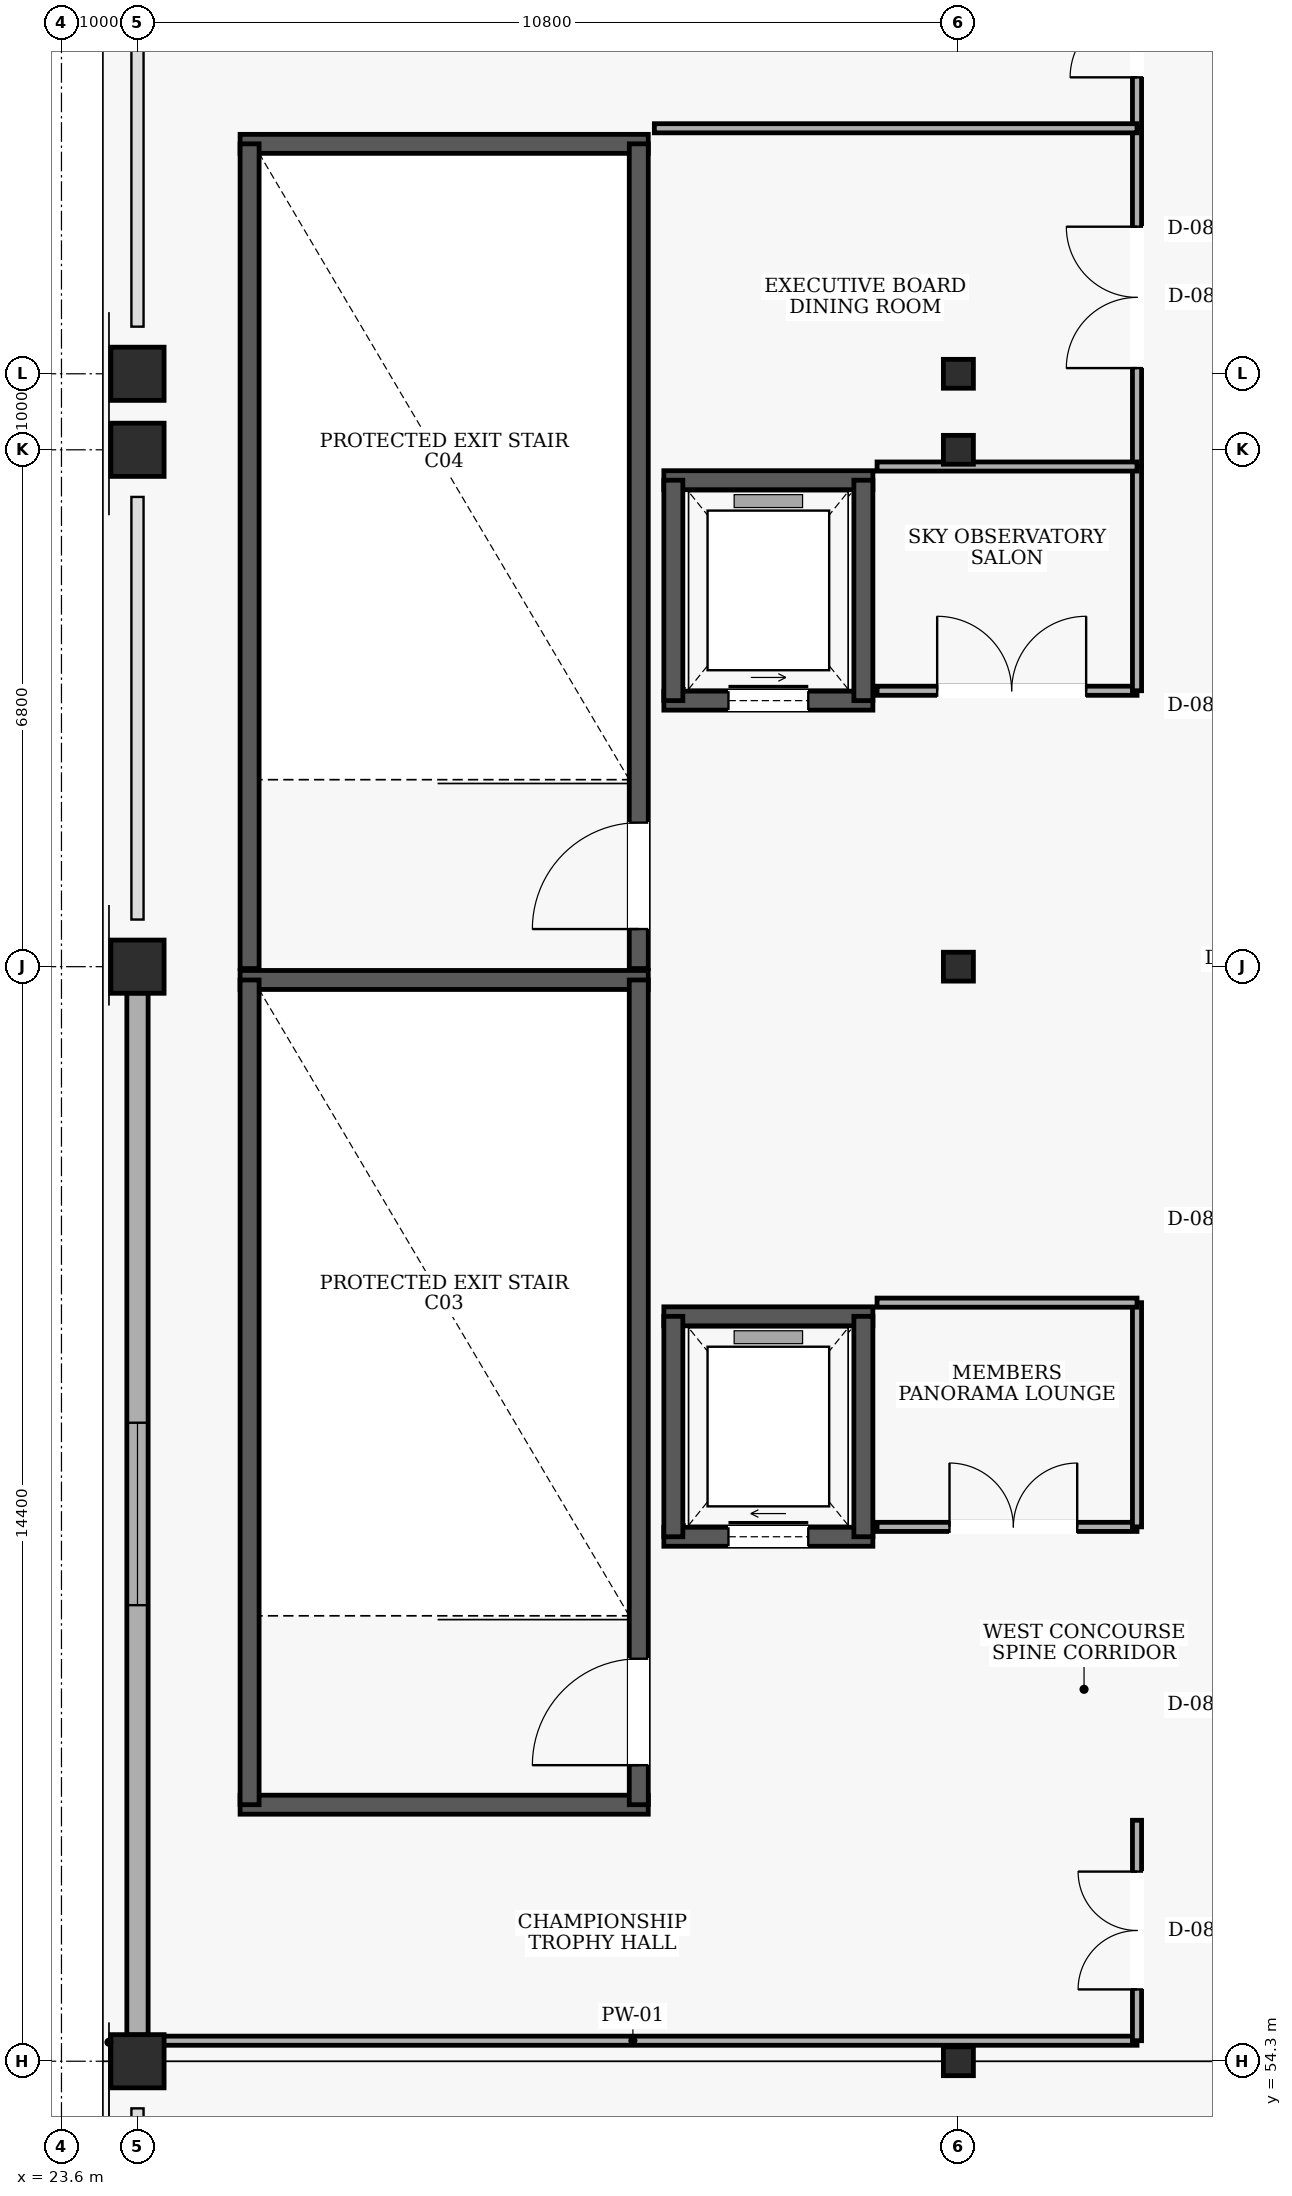
"""IFC4 building model, lengths in metres.
Left out: names, types, materials, properties, quantities, classifications, styles, units other than length and angle.
Written with IfcOpenShell. Run it as: python <this file> out.ifc"""

import sys

from ifc_helpers import new_model, si_unit, direction, frame, frame_2d, origin, origin_2d, place, context, subcontext, project, spatial, rectangle, i_section, extrude, element, fill, save


model = new_model("IFC4")
c1 = context("Model", 3, precision=1e-05, world=origin(), true_north=direction((0.0, 1.0)))
c2 = subcontext(c1, "Body", "Model", "MODEL_VIEW")
j1 = project(units=[si_unit("LENGTHUNIT", "METRE"), si_unit("PLANEANGLEUNIT", "RADIAN")], contexts=[c1])
p1 = place(None, origin())
s1 = spatial("IfcSite", under=j1, at=p1, CompositionType="ELEMENT")
p2 = place(p1, origin())
s2 = spatial("IfcBuilding", under=s1, at=p2, CompositionType="ELEMENT")
p3 = place(p2, frame((0.0, 0.0, 29.4)))
s3 = spatial("IfcBuildingStorey", under=s2, at=p3, CompositionType="ELEMENT", Elevation=29.4)
for number, where, z_axis, x_axis in (
    (1, (24.6, 54.3, 0.0), (0.0, 0.0, 1.0), (1.0, 0.0, 0.0)),
    (2, (24.6, 68.7, 0.0), (0.0, 0.0, 1.0), (1.0, 0.0, 0.0)),
    (3, (24.6, 75.5, 0.0), (0.0, 0.0, 1.0), (1.0, 0.0, 0.0)),
    (4, (24.6, 76.5, 0.0), (0.0, 0.0, 1.0), (1.0, 0.0, 0.0)),
):
    element("IfcColumn", number, at=place(p3, frame(where, z_axis=z_axis, x_axis=x_axis)), inside=s3, PredefinedType="COLUMN", context=c2, shape_type="SweptSolid", body=[
        extrude(rectangle(XDim=0.7, YDim=0.7, at=origin_2d()), origin(), (0.0, 0.0, 1.0), 4.8),
    ])
for number, where, z_axis, x_axis in (
    (5, (35.4, 54.3, 0.0), (0.0, 0.0, 1.0), (1.0, 0.0, 0.0)),
    (6, (35.4, 68.7, 0.0), (0.0, 0.0, 1.0), (1.0, 0.0, 0.0)),
    (7, (35.4, 75.5, 0.0), (0.0, 0.0, 1.0), (1.0, 0.0, 0.0)),
    (8, (35.4, 76.5, 0.0), (0.0, 0.0, 1.0), (1.0, 0.0, 0.0)),
):
    element("IfcColumn", number, at=place(p3, frame(where, z_axis=z_axis, x_axis=x_axis)), inside=s3, PredefinedType="COLUMN", context=c2, shape_type="SweptSolid", body=[
        extrude(i_section(OverallWidth=0.395, OverallDepth=0.38, WebThickness=0.019, FlangeThickness=0.03, at=origin_2d()), origin(), (0.0, 0.0, 1.0), 4.8),
    ])
p4 = place(p3, frame((24.6, 54.645, 0.0), z_axis=(0.0, 0.0, 1.0), x_axis=(0.0, 1.0, 0.0)))
e9 = element("IfcWall", 9, at=p4, inside=s3, PredefinedType="SOLIDWALL", context=c2, shape_type="SweptSolid", body=[
    extrude(rectangle(XDim=13.71, YDim=0.28, at=frame_2d((6.855, 0.0))), origin(), (0.0, 0.0, 1.0), 3.68),
])
p5 = place(p4, frame((5.655, 0.0, 0.9)))
e10 = element("IfcOpeningElement", 10, at=p5, cuts=e9, PredefinedType="OPENING", context=c2, shape_type="SweptSolid", body=[
    extrude(rectangle(XDim=2.4, YDim=1.8, at=frame_2d((1.2, 0.9))), frame((0.0, 0.15, 0.0), z_axis=(0.0, -1.0, 0.0), x_axis=(1.0, 0.0, 0.0)), (0.0, 0.0, 1.0), 0.3),
])
for number, where, z_axis, x_axis in (
    (11, (25.95, 57.675, 0.0), (0.0, 0.0, 1.0), (1.0, 0.0, 0.0)),
    (12, (31.32, 68.525, 0.0), (0.0, 0.0, 1.0), (-1.0, 0.0, 0.0)),
):
    element("IfcWall", number, at=place(p3, frame(where, z_axis=z_axis, x_axis=x_axis)), inside=s3, PredefinedType="SHEAR", context=c2, shape_type="SweptSolid", body=[
        extrude(rectangle(XDim=5.37, YDim=0.25, at=frame_2d((2.685, 0.0))), origin(), (0.0, 0.0, 1.0), 4.5),
    ])
p6 = place(p3, frame((26.075, 57.675, 0.0), z_axis=(0.0, 0.0, 1.0), x_axis=(0.0, 1.0, 0.0)))
e13 = element("IfcWall", 13, at=p6, inside=s3, PredefinedType="SHEAR", context=c2, shape_type="SweptSolid", body=[
    extrude(rectangle(XDim=10.85, YDim=0.25, at=frame_2d((5.425, 0.0))), origin(), (0.0, 0.0, 1.0), 4.5),
])
p7 = place(p3, frame((31.195, 57.675, 0.0), z_axis=(0.0, 0.0, 1.0), x_axis=(0.0, 1.0, 0.0)))
e14 = element("IfcWall", 14, at=p7, inside=s3, PredefinedType="SHEAR", context=c2, shape_type="SweptSolid", body=[
    extrude(rectangle(XDim=10.85, YDim=0.25, at=frame_2d((5.425, 0.0))), origin(), (0.0, 0.0, 1.0), 4.5),
])
p8 = place(p7, frame((0.52, 0.0, 0.0)))
e15 = element("IfcOpeningElement", 15, at=p8, cuts=e14, PredefinedType="OPENING", context=c2, shape_type="SweptSolid", body=[
    extrude(rectangle(XDim=1.4, YDim=2.15, at=frame_2d((0.7, 1.075))), frame((0.0, 0.135, 0.0), z_axis=(0.0, -1.0, 0.0), x_axis=(1.0, 0.0, 0.0)), (0.0, 0.0, 1.0), 0.27),
])
p9 = place(p3, frame((31.32, 79.525, 0.0), z_axis=(0.0, 0.0, 1.0), x_axis=(-1.0, 0.0, 0.0)))
e16 = element("IfcWall", 16, at=p9, inside=s3, PredefinedType="SHEAR", context=c2, shape_type="SweptSolid", body=[
    extrude(rectangle(XDim=5.37, YDim=0.25, at=frame_2d((2.685, 0.0))), origin(), (0.0, 0.0, 1.0), 4.5),
])
p10 = place(p3, frame((26.075, 68.675, 0.0), z_axis=(0.0, 0.0, 1.0), x_axis=(0.0, 1.0, 0.0)))
e17 = element("IfcWall", 17, at=p10, inside=s3, PredefinedType="SHEAR", context=c2, shape_type="SweptSolid", body=[
    extrude(rectangle(XDim=10.85, YDim=0.25, at=frame_2d((5.425, 0.0))), origin(), (0.0, 0.0, 1.0), 4.5),
])
p11 = place(p3, frame((31.195, 68.675, 0.0), z_axis=(0.0, 0.0, 1.0), x_axis=(0.0, 1.0, 0.0)))
e18 = element("IfcWall", 18, at=p11, inside=s3, PredefinedType="SHEAR", context=c2, shape_type="SweptSolid", body=[
    extrude(rectangle(XDim=10.85, YDim=0.25, at=frame_2d((5.425, 0.0))), origin(), (0.0, 0.0, 1.0), 4.5),
])
p12 = place(p11, frame((0.52, 0.0, 0.0)))
e19 = element("IfcOpeningElement", 19, at=p12, cuts=e18, PredefinedType="OPENING", context=c2, shape_type="SweptSolid", body=[
    extrude(rectangle(XDim=1.4, YDim=2.15, at=frame_2d((0.7, 1.075))), frame((0.0, 0.135, 0.0), z_axis=(0.0, -1.0, 0.0), x_axis=(1.0, 0.0, 0.0)), (0.0, 0.0, 1.0), 0.27),
])
p13 = place(p3, frame((31.525, 61.2, 0.0), z_axis=(0.0, 0.0, 1.0), x_axis=(1.0, 0.0, 0.0)))
e20 = element("IfcWall", 20, at=p13, inside=s3, PredefinedType="SHEAR", context=c2, shape_type="SweptSolid", body=[
    extrude(rectangle(XDim=2.75, YDim=0.25, at=frame_2d((1.375, 0.0))), origin(), (0.0, 0.0, 1.0), 4.5),
])
p14 = place(p13, frame((0.85, 0.0, 0.0)))
e21 = element("IfcOpeningElement", 21, at=p14, cuts=e20, PredefinedType="OPENING", context=c2, shape_type="SweptSolid", body=[
    extrude(rectangle(XDim=1.05, YDim=2.15, at=frame_2d((0.525, 1.075))), frame((0.0, 0.135, 0.0), z_axis=(0.0, -1.0, 0.0), x_axis=(1.0, 0.0, 0.0)), (0.0, 0.0, 1.0), 0.27),
])
p15 = place(p3, frame((34.275, 64.1, 0.0), z_axis=(0.0, 0.0, 1.0), x_axis=(-1.0, 0.0, 0.0)))
e22 = element("IfcWall", 22, at=p15, inside=s3, PredefinedType="SHEAR", context=c2, shape_type="SweptSolid", body=[
    extrude(rectangle(XDim=2.75, YDim=0.25, at=frame_2d((1.375, 0.0))), origin(), (0.0, 0.0, 1.0), 4.5),
])
for number, where, z_axis, x_axis in (
    (23, (31.65, 64.1, 0.0), (0.0, 0.0, 1.0), (0.0, -1.0, 0.0)),
    (24, (34.15, 61.2, 0.0), (0.0, 0.0, 1.0), (0.0, 1.0, 0.0)),
):
    element("IfcWall", number, at=place(p3, frame(where, z_axis=z_axis, x_axis=x_axis)), inside=s3, PredefinedType="SHEAR", context=c2, shape_type="SweptSolid", body=[
        extrude(rectangle(XDim=2.9, YDim=0.25, at=frame_2d((1.45, 0.0))), origin(), (0.0, 0.0, 1.0), 4.5),
    ])
p16 = place(p3, frame((31.525, 72.2, 0.0), z_axis=(0.0, 0.0, 1.0), x_axis=(1.0, 0.0, 0.0)))
e25 = element("IfcWall", 25, at=p16, inside=s3, PredefinedType="SHEAR", context=c2, shape_type="SweptSolid", body=[
    extrude(rectangle(XDim=2.75, YDim=0.25, at=frame_2d((1.375, 0.0))), origin(), (0.0, 0.0, 1.0), 4.5),
])
p17 = place(p16, frame((0.85, 0.0, 0.0)))
e26 = element("IfcOpeningElement", 26, at=p17, cuts=e25, PredefinedType="OPENING", context=c2, shape_type="SweptSolid", body=[
    extrude(rectangle(XDim=1.05, YDim=2.15, at=frame_2d((0.525, 1.075))), frame((0.0, 0.135, 0.0), z_axis=(0.0, -1.0, 0.0), x_axis=(1.0, 0.0, 0.0)), (0.0, 0.0, 1.0), 0.27),
])
p18 = place(p3, frame((34.275, 75.1, 0.0), z_axis=(0.0, 0.0, 1.0), x_axis=(-1.0, 0.0, 0.0)))
e27 = element("IfcWall", 27, at=p18, inside=s3, PredefinedType="SHEAR", context=c2, shape_type="SweptSolid", body=[
    extrude(rectangle(XDim=2.75, YDim=0.25, at=frame_2d((1.375, 0.0))), origin(), (0.0, 0.0, 1.0), 4.5),
])
for number, where, z_axis, x_axis in (
    (28, (31.65, 75.1, 0.0), (0.0, 0.0, 1.0), (0.0, -1.0, 0.0)),
    (29, (34.15, 72.2, 0.0), (0.0, 0.0, 1.0), (0.0, 1.0, 0.0)),
):
    element("IfcWall", number, at=place(p3, frame(where, z_axis=z_axis, x_axis=x_axis)), inside=s3, PredefinedType="SHEAR", context=c2, shape_type="SweptSolid", body=[
        extrude(rectangle(XDim=2.9, YDim=0.25, at=frame_2d((1.45, 0.0))), origin(), (0.0, 0.0, 1.0), 4.5),
    ])
p19 = place(p3, frame((24.485, 54.57, 0.0), z_axis=(0.0, 0.0, 1.0), x_axis=(1.0, 0.0, 0.0)))
e30 = element("IfcWall", 30, at=p19, inside=s3, PredefinedType="PARTITIONING", context=c2, shape_type="SweptSolid", body=[
    extrude(rectangle(XDim=13.265, YDim=0.12, at=frame_2d((6.632, 0.0))), origin(), (0.0, 0.0, 1.0), 3.78),
])
p20 = place(p3, frame((37.75, 54.57, 0.0), z_axis=(0.0, 0.0, 1.0), x_axis=(0.0, 1.0, 0.0)))
e31 = element("IfcWall", 31, at=p20, inside=s3, PredefinedType="PARTITIONING", context=c2, shape_type="SweptSolid", body=[
    extrude(rectangle(XDim=2.9, YDim=0.12, at=frame_2d((1.45, 0.0))), origin(), (0.0, 0.0, 1.0), 4.5),
])
p21 = place(p20, frame((0.675, 0.0, 0.0)))
e32 = element("IfcOpeningElement", 32, at=p21, cuts=e31, PredefinedType="OPENING", context=c2, shape_type="SweptSolid", body=[
    extrude(rectangle(XDim=1.55, YDim=2.2, at=frame_2d((0.775, 1.1))), frame((0.0, 0.07, 0.0), z_axis=(0.0, -1.0, 0.0), x_axis=(1.0, 0.0, 0.0)), (0.0, 0.0, 1.0), 0.14),
])
p22 = place(p3, frame((34.33, 61.33, 0.0), z_axis=(0.0, 0.0, 1.0), x_axis=(1.0, 0.0, 0.0)))
e33 = element("IfcWall", 33, at=p22, inside=s3, PredefinedType="PARTITIONING", context=c2, shape_type="SweptSolid", body=[
    extrude(rectangle(XDim=3.42, YDim=0.12, at=frame_2d((1.71, 0.0))), origin(), (0.0, 0.0, 1.0), 4.5),
])
p23 = place(p22, frame((0.953, 0.0, 0.0)))
e34 = element("IfcOpeningElement", 34, at=p23, cuts=e33, PredefinedType="OPENING", context=c2, shape_type="SweptSolid", body=[
    extrude(rectangle(XDim=1.68, YDim=2.25, at=frame_2d((0.84, 1.125))), frame((0.0, 0.07, 0.0), z_axis=(0.0, -1.0, 0.0), x_axis=(1.0, 0.0, 0.0)), (0.0, 0.0, 1.0), 0.14),
])
p24 = place(p3, frame((37.75, 61.33, 0.0), z_axis=(0.0, 0.0, 1.0), x_axis=(0.0, 1.0, 0.0)))
e35 = element("IfcWall", 35, at=p24, inside=s3, PredefinedType="PARTITIONING", context=c2, shape_type="SweptSolid", body=[
    extrude(rectangle(XDim=2.95, YDim=0.12, at=frame_2d((1.475, 0.0))), origin(), (0.0, 0.0, 1.0), 4.5),
])
p25 = place(p3, frame((37.75, 64.28, 0.0), z_axis=(0.0, 0.0, 1.0), x_axis=(-1.0, 0.0, 0.0)))
e36 = element("IfcWall", 36, at=p25, inside=s3, PredefinedType="PARTITIONING", context=c2, shape_type="SweptSolid", body=[
    extrude(rectangle(XDim=3.42, YDim=0.12, at=frame_2d((1.71, 0.0))), origin(), (0.0, 0.0, 1.0), 4.5),
])
p26 = place(p3, frame((37.75, 79.73, 0.0), z_axis=(0.0, 0.0, 1.0), x_axis=(0.0, 1.0, 0.0)))
e37 = element("IfcWall", 37, at=p26, inside=s3, PredefinedType="PARTITIONING", context=c2, shape_type="SweptSolid", body=[
    extrude(rectangle(XDim=3.1, YDim=0.12, at=frame_2d((1.55, 0.0))), origin(), (0.0, 0.0, 1.0), 4.5),
])
p27 = place(p26, frame((0.67, 0.0, 0.0)))
e38 = element("IfcOpeningElement", 38, at=p27, cuts=e37, PredefinedType="OPENING", context=c2, shape_type="SweptSolid", body=[
    extrude(rectangle(XDim=1.76, YDim=2.25, at=frame_2d((0.88, 1.125))), frame((0.0, 0.07, 0.0), z_axis=(0.0, -1.0, 0.0), x_axis=(1.0, 0.0, 0.0)), (0.0, 0.0, 1.0), 0.14),
])
p28 = place(p3, frame((37.75, 75.28, 0.0), z_axis=(0.0, 0.0, 1.0), x_axis=(0.0, 1.0, 0.0)))
e39 = element("IfcWall", 39, at=p28, inside=s3, PredefinedType="PARTITIONING", context=c2, shape_type="SweptSolid", body=[
    extrude(rectangle(XDim=4.45, YDim=0.12, at=frame_2d((2.225, 0.0))), origin(), (0.0, 0.0, 1.0), 4.5),
])
p29 = place(p28, frame((1.295, 0.0, 0.0)))
e40 = element("IfcOpeningElement", 40, at=p29, cuts=e39, PredefinedType="OPENING", context=c2, shape_type="SweptSolid", body=[
    extrude(rectangle(XDim=1.86, YDim=2.3, at=frame_2d((0.93, 1.15))), frame((0.0, 0.07, 0.0), z_axis=(0.0, -1.0, 0.0), x_axis=(1.0, 0.0, 0.0)), (0.0, 0.0, 1.0), 0.14),
])
p30 = place(p3, frame((37.75, 79.73, 0.0), z_axis=(0.0, 0.0, 1.0), x_axis=(-1.0, 0.0, 0.0)))
e41 = element("IfcWall", 41, at=p30, inside=s3, PredefinedType="PARTITIONING", context=c2, shape_type="SweptSolid", body=[
    extrude(rectangle(XDim=6.35, YDim=0.12, at=frame_2d((3.175, 0.0))), origin(), (0.0, 0.0, 1.0), 4.5),
])
p31 = place(p3, frame((34.33, 72.33, 0.0), z_axis=(0.0, 0.0, 1.0), x_axis=(1.0, 0.0, 0.0)))
e42 = element("IfcWall", 42, at=p31, inside=s3, PredefinedType="PARTITIONING", context=c2, shape_type="SweptSolid", body=[
    extrude(rectangle(XDim=3.42, YDim=0.12, at=frame_2d((1.71, 0.0))), origin(), (0.0, 0.0, 1.0), 4.5),
])
p32 = place(p31, frame((0.791, 0.0, 0.0)))
e43 = element("IfcOpeningElement", 43, at=p32, cuts=e42, PredefinedType="OPENING", context=c2, shape_type="SweptSolid", body=[
    extrude(rectangle(XDim=1.96, YDim=2.3, at=frame_2d((0.98, 1.15))), frame((0.0, 0.07, 0.0), z_axis=(0.0, -1.0, 0.0), x_axis=(1.0, 0.0, 0.0)), (0.0, 0.0, 1.0), 0.14),
])
p33 = place(p3, frame((37.75, 72.33, 0.0), z_axis=(0.0, 0.0, 1.0), x_axis=(0.0, 1.0, 0.0)))
e44 = element("IfcWall", 44, at=p33, inside=s3, PredefinedType="PARTITIONING", context=c2, shape_type="SweptSolid", body=[
    extrude(rectangle(XDim=2.95, YDim=0.12, at=frame_2d((1.475, 0.0))), origin(), (0.0, 0.0, 1.0), 4.5),
])
p34 = place(p3, frame((37.75, 75.28, 0.0), z_axis=(0.0, 0.0, 1.0), x_axis=(-1.0, 0.0, 0.0)))
e45 = element("IfcWall", 45, at=p34, inside=s3, PredefinedType="PARTITIONING", context=c2, shape_type="SweptSolid", body=[
    extrude(rectangle(XDim=3.42, YDim=0.12, at=frame_2d((1.71, 0.0))), origin(), (0.0, 0.0, 1.0), 3.78),
])
p35 = place(p5, origin())
e46 = element("IfcWindow", 46, at=p35, inside=s3, PartitioningType="SINGLE_PANEL", PredefinedType="WINDOW", context=c2, shape_type="SweptSolid", body=[
    extrude(rectangle(XDim=2.4, YDim=1.8, at=frame_2d((1.2, 0.9))), frame((0.0, 0.03, 0.0), z_axis=(0.0, -1.0, 0.0), x_axis=(1.0, 0.0, 0.0)), (0.0, 0.0, 1.0), 0.06),
])
fill(e10, e46)
p36 = place(p8, origin())
e47 = element("IfcDoor", 47, at=p36, inside=s3, OperationType="SINGLE_SWING_LEFT", PredefinedType="DOOR", context=c2, shape_type="SweptSolid", body=[
    extrude(rectangle(XDim=1.4, YDim=2.15, at=frame_2d((0.7, 1.075))), frame((0.0, 0.025, 0.0), z_axis=(0.0, -1.0, 0.0), x_axis=(1.0, 0.0, 0.0)), (0.0, 0.0, 1.0), 0.05),
])
fill(e15, e47)
p37 = place(p12, origin())
e48 = element("IfcDoor", 48, at=p37, inside=s3, OperationType="SINGLE_SWING_LEFT", PredefinedType="DOOR", context=c2, shape_type="SweptSolid", body=[
    extrude(rectangle(XDim=1.4, YDim=2.15, at=frame_2d((0.7, 1.075))), frame((0.0, 0.025, 0.0), z_axis=(0.0, -1.0, 0.0), x_axis=(1.0, 0.0, 0.0)), (0.0, 0.0, 1.0), 0.05),
])
fill(e19, e48)
p38 = place(p14, origin())
e49 = element("IfcDoor", 49, at=p38, inside=s3, OperationType="SLIDING_TO_RIGHT", PredefinedType="DOOR", context=c2, shape_type="SweptSolid", body=[
    extrude(rectangle(XDim=1.05, YDim=2.15, at=frame_2d((0.525, 1.075))), frame((0.0, 0.025, 0.0), z_axis=(0.0, -1.0, 0.0), x_axis=(1.0, 0.0, 0.0)), (0.0, 0.0, 1.0), 0.05),
])
fill(e21, e49)
p39 = place(p17, origin())
e50 = element("IfcDoor", 50, at=p39, inside=s3, OperationType="SLIDING_TO_LEFT", PredefinedType="DOOR", context=c2, shape_type="SweptSolid", body=[
    extrude(rectangle(XDim=1.05, YDim=2.15, at=frame_2d((0.525, 1.075))), frame((0.0, 0.025, 0.0), z_axis=(0.0, -1.0, 0.0), x_axis=(1.0, 0.0, 0.0)), (0.0, 0.0, 1.0), 0.05),
])
fill(e26, e50)
p40 = place(p21, origin())
e51 = element("IfcDoor", 51, at=p40, inside=s3, OperationType="DOUBLE_DOOR_SINGLE_SWING", PredefinedType="DOOR", context=c2, shape_type="SweptSolid", body=[
    extrude(rectangle(XDim=1.55, YDim=2.2, at=frame_2d((0.775, 1.1))), frame((0.0, 0.025, 0.0), z_axis=(0.0, -1.0, 0.0), x_axis=(1.0, 0.0, 0.0)), (0.0, 0.0, 1.0), 0.05),
])
fill(e32, e51)
p41 = place(p23, origin())
e52 = element("IfcDoor", 52, at=p41, inside=s3, OperationType="DOUBLE_DOOR_SINGLE_SWING", PredefinedType="DOOR", context=c2, shape_type="SweptSolid", body=[
    extrude(rectangle(XDim=1.68, YDim=2.25, at=frame_2d((0.84, 1.125))), frame((0.0, 0.025, 0.0), z_axis=(0.0, -1.0, 0.0), x_axis=(1.0, 0.0, 0.0)), (0.0, 0.0, 1.0), 0.05),
])
fill(e34, e52)
p42 = place(p27, origin())
e53 = element("IfcDoor", 53, at=p42, inside=s3, OperationType="DOUBLE_DOOR_SINGLE_SWING", PredefinedType="DOOR", context=c2, shape_type="SweptSolid", body=[
    extrude(rectangle(XDim=1.76, YDim=2.25, at=frame_2d((0.88, 1.125))), frame((0.0, 0.025, 0.0), z_axis=(0.0, -1.0, 0.0), x_axis=(1.0, 0.0, 0.0)), (0.0, 0.0, 1.0), 0.05),
])
fill(e38, e53)
p43 = place(p29, origin())
e54 = element("IfcDoor", 54, at=p43, inside=s3, OperationType="DOUBLE_DOOR_SINGLE_SWING", PredefinedType="DOOR", context=c2, shape_type="SweptSolid", body=[
    extrude(rectangle(XDim=1.86, YDim=2.3, at=frame_2d((0.93, 1.15))), frame((0.0, 0.025, 0.0), z_axis=(0.0, -1.0, 0.0), x_axis=(1.0, 0.0, 0.0)), (0.0, 0.0, 1.0), 0.05),
])
fill(e40, e54)
p44 = place(p32, origin())
e55 = element("IfcDoor", 55, at=p44, inside=s3, OperationType="DOUBLE_DOOR_SINGLE_SWING", PredefinedType="DOOR", context=c2, shape_type="SweptSolid", body=[
    extrude(rectangle(XDim=1.96, YDim=2.3, at=frame_2d((0.98, 1.15))), frame((0.0, 0.025, 0.0), z_axis=(0.0, -1.0, 0.0), x_axis=(1.0, 0.0, 0.0)), (0.0, 0.0, 1.0), 0.05),
])
fill(e43, e55)
save(model, sys.argv[1])
